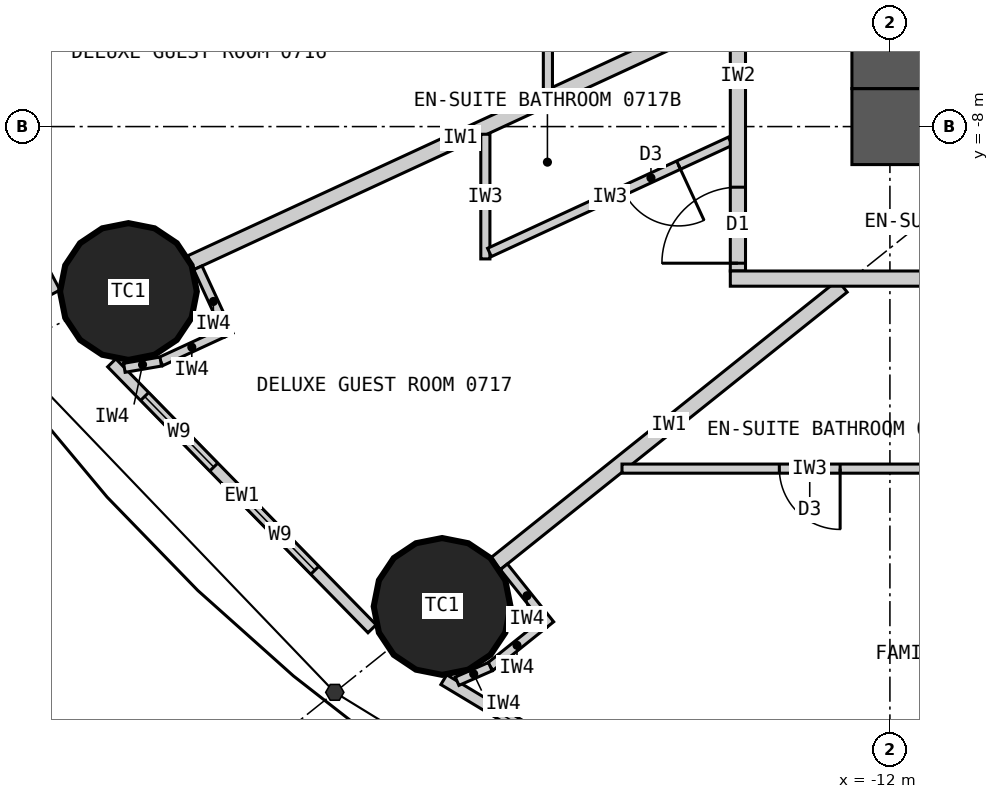
"""IFC4 building model, lengths in metres.
Left out: names, types, materials, properties, quantities, classifications, styles, units other than length and angle.
Written with IfcOpenShell. Run it as: python <this file> out.ifc"""

import sys

from ifc_helpers import new_model, si_unit, direction, frame, frame_2d, origin, origin_2d, place, context, subcontext, project, spatial, rectangle, circle, extrude, element, fill, save


model = new_model("IFC4")
c1 = context("Model", 3, precision=1e-05, world=origin(), true_north=direction((0.0, 1.0)))
c2 = subcontext(c1, "Body", "Model", "MODEL_VIEW")
j1 = project(units=[si_unit("LENGTHUNIT", "METRE"), si_unit("PLANEANGLEUNIT", "RADIAN")], contexts=[c1])
p1 = place(None, origin())
s1 = spatial("IfcSite", under=j1, at=p1, CompositionType="ELEMENT")
p2 = place(p1, origin())
s2 = spatial("IfcBuilding", under=s1, at=p2, CompositionType="ELEMENT")
p3 = place(p2, frame((0.0, 0.0, 36.0)))
s3 = spatial("IfcBuildingStorey", under=s2, at=p3, CompositionType="ELEMENT", Elevation=36.0)
for number, where, z_axis, x_axis in (
    (1, (-22.019, -10.17, 0.0), (0.0, 0.0, 1.0), (1.0, 0.0, 0.0)),
    (2, (-17.892, -14.313, 0.0), (0.0, 0.0, 1.0), (1.0, 0.0, 0.0)),
):
    element("IfcColumn", number, at=place(p3, frame(where, z_axis=z_axis, x_axis=x_axis)), inside=s3, PredefinedType="COLUMN", context=c2, shape_type="SweptSolid", body=[
        extrude(circle(Radius=0.9, at=origin_2d()), origin(), (0.0, 0.0, 1.0), 3.3),
    ])
p4 = place(p3, frame((12.5, -8.0, 0.0), z_axis=(0.0, 0.0, 1.0), x_axis=(-1.0, 0.0, 0.0)))
e3 = element("IfcWall", 3, at=p4, inside=s3, PredefinedType="SHEAR", context=c2, shape_type="SweptSolid", body=[
    extrude(rectangle(XDim=25.0, YDim=1.0, at=frame_2d((12.5, 0.0))), origin(), (0.0, 0.0, 1.0), 3.3),
])
p5 = place(p4, frame((11.2, 0.0, 0.0)))
e4 = element("IfcOpeningElement", 4, at=p5, cuts=e3, PredefinedType="OPENING", context=c2, shape_type="SweptSolid", body=[
    extrude(rectangle(XDim=1.2, YDim=2.2, at=frame_2d((0.6, 1.1))), frame((0.0, 0.51, 0.0), z_axis=(0.0, -1.0, 0.0), x_axis=(1.0, 0.0, 0.0)), (0.0, 0.0, 1.0), 1.02),
])
p6 = place(p4, frame((18.8, 0.0, 0.0)))
e5 = element("IfcOpeningElement", 5, at=p6, cuts=e3, PredefinedType="OPENING", context=c2, shape_type="SweptSolid", body=[
    extrude(rectangle(XDim=0.9, YDim=2.2, at=frame_2d((0.45, 1.1))), frame((0.0, 0.51, 0.0), z_axis=(0.0, -1.0, 0.0), x_axis=(1.0, 0.0, 0.0)), (0.0, 0.0, 1.0), 1.02),
])
p7 = place(p3, frame((-12.0, 7.5, 0.0), z_axis=(0.0, 0.0, 1.0), x_axis=(0.0, -1.0, 0.0)))
e6 = element("IfcWall", 6, at=p7, inside=s3, PredefinedType="SHEAR", context=c2, shape_type="SweptSolid", body=[
    extrude(rectangle(XDim=15.0, YDim=1.0, at=frame_2d((7.5, 0.0))), origin(), (0.0, 0.0, 1.0), 3.3),
])
p8 = place(p7, frame((6.6, 0.0, 0.0)))
e7 = element("IfcOpeningElement", 7, at=p8, cuts=e6, PredefinedType="OPENING", context=c2, shape_type="SweptSolid", body=[
    extrude(rectangle(XDim=1.8, YDim=2.2, at=frame_2d((0.9, 1.1))), frame((0.0, 0.51, 0.0), z_axis=(0.0, -1.0, 0.0), x_axis=(1.0, 0.0, 0.0)), (0.0, 0.0, 1.0), 1.02),
])
p9 = place(p3, frame((-25.139, -6.113, 0.0), z_axis=(0.0, 0.0, 1.0), x_axis=(0.467303182954, -0.884097129959, 0.0)))
e8 = element("IfcWall", 8, at=p9, inside=s3, PredefinedType="ELEMENTEDWALL", context=c2, shape_type="SweptSolid", body=[
    extrude(rectangle(XDim=4.606, YDim=0.15, at=frame_2d((2.303, 0.0))), origin(), (0.0, 0.0, 1.0), 3.12),
])
p10 = place(p9, frame((0.531, 0.0, 0.9)))
e9 = element("IfcOpeningElement", 9, at=p10, cuts=e8, PredefinedType="OPENING", context=c2, shape_type="SweptSolid", body=[
    extrude(rectangle(XDim=1.3, YDim=1.9, at=frame_2d((0.65, 0.95))), frame((0.0, 0.085, 0.0), z_axis=(0.0, -1.0, 0.0), x_axis=(1.0, 0.0, 0.0)), (0.0, 0.0, 1.0), 0.17),
])
p11 = place(p9, frame((2.432, 0.0, 0.9)))
e10 = element("IfcOpeningElement", 10, at=p11, cuts=e8, PredefinedType="OPENING", context=c2, shape_type="SweptSolid", body=[
    extrude(rectangle(XDim=1.3, YDim=1.9, at=frame_2d((0.65, 0.95))), frame((0.0, 0.085, 0.0), z_axis=(0.0, -1.0, 0.0), x_axis=(1.0, 0.0, 0.0)), (0.0, 0.0, 1.0), 0.17),
])
p12 = place(p3, frame((-22.239, -11.108, 0.0), z_axis=(0.0, 0.0, 1.0), x_axis=(0.699612594083, -0.714522370679, 0.0)))
e11 = element("IfcWall", 11, at=p12, inside=s3, PredefinedType="ELEMENTEDWALL", context=c2, shape_type="SweptSolid", body=[
    extrude(rectangle(XDim=4.896, YDim=0.15, at=frame_2d((2.448, 0.0))), origin(), (0.0, 0.0, 1.0), 3.12),
])
p13 = place(p12, frame((0.619, 0.0, 0.9)))
e12 = element("IfcOpeningElement", 12, at=p13, cuts=e11, PredefinedType="OPENING", context=c2, shape_type="SweptSolid", body=[
    extrude(rectangle(XDim=1.3, YDim=1.9, at=frame_2d((0.65, 0.95))), frame((0.0, 0.085, 0.0), z_axis=(0.0, -1.0, 0.0), x_axis=(1.0, 0.0, 0.0)), (0.0, 0.0, 1.0), 0.17),
])
p14 = place(p12, frame((2.519, 0.0, 0.9)))
e13 = element("IfcOpeningElement", 13, at=p14, cuts=e11, PredefinedType="OPENING", context=c2, shape_type="SweptSolid", body=[
    extrude(rectangle(XDim=1.3, YDim=1.9, at=frame_2d((0.65, 0.95))), frame((0.0, 0.085, 0.0), z_axis=(0.0, -1.0, 0.0), x_axis=(1.0, 0.0, 0.0)), (0.0, 0.0, 1.0), 0.17),
])
p15 = place(p3, frame((-17.869, -15.277, 0.0), z_axis=(0.0, 0.0, 1.0), x_axis=(0.856958191554, -0.515385931054, 0.0)))
e14 = element("IfcWall", 14, at=p15, inside=s3, PredefinedType="ELEMENTEDWALL", context=c2, shape_type="SweptSolid", body=[
    extrude(rectangle(XDim=5.201, YDim=0.15, at=frame_2d((2.601, 0.0))), origin(), (0.0, 0.0, 1.0), 3.12),
])
p16 = place(p15, frame((0.776, 0.0, 0.9)))
e15 = element("IfcOpeningElement", 15, at=p16, cuts=e14, PredefinedType="OPENING", context=c2, shape_type="SweptSolid", body=[
    extrude(rectangle(XDim=1.3, YDim=1.9, at=frame_2d((0.65, 0.95))), frame((0.0, 0.085, 0.0), z_axis=(0.0, -1.0, 0.0), x_axis=(1.0, 0.0, 0.0)), (0.0, 0.0, 1.0), 0.17),
])
p17 = place(p15, frame((2.676, 0.0, 0.9)))
e16 = element("IfcOpeningElement", 16, at=p17, cuts=e14, PredefinedType="OPENING", context=c2, shape_type="SweptSolid", body=[
    extrude(rectangle(XDim=1.3, YDim=1.9, at=frame_2d((0.65, 0.95))), frame((0.0, 0.085, 0.0), z_axis=(0.0, -1.0, 0.0), x_axis=(1.0, 0.0, 0.0)), (0.0, 0.0, 1.0), 0.17),
])
p18 = place(p3, frame((-14.1, -6.512, 0.0), z_axis=(0.0, 0.0, 1.0), x_axis=(-0.907842433118, -0.41931147925, 0.0)))
e17 = element("IfcWall", 17, at=p18, inside=s3, PredefinedType="PARTITIONING", context=c2, shape_type="SweptSolid", body=[
    extrude(rectangle(XDim=7.823, YDim=0.2, at=frame_2d((3.912, 0.0))), origin(), (0.0, 0.0, 1.0), 2.32),
])
p19 = place(p3, frame((-12.625, -10.1, 0.0), z_axis=(0.0, 0.0, 1.0), x_axis=(-0.780872884676, -0.624689953479, 0.0)))
e18 = element("IfcWall", 18, at=p19, inside=s3, PredefinedType="PARTITIONING", context=c2, shape_type="SweptSolid", body=[
    extrude(rectangle(XDim=5.845, YDim=0.2, at=frame_2d((2.922, 0.0))), origin(), (0.0, 0.0, 1.0), 2.32),
])
p20 = place(p3, frame((-16.5, -7.521, 0.0), z_axis=(0.0, 0.0, 1.0), x_axis=(0.0, 1.0, 0.0)))
e19 = element("IfcWall", 19, at=p20, inside=s3, PredefinedType="PARTITIONING", context=c2, shape_type="SweptSolid", body=[
    extrude(rectangle(XDim=2.749, YDim=0.12, at=frame_2d((1.374, 0.0))), origin(), (0.0, 0.0, 1.0), 3.12),
])
p21 = place(p3, frame((-17.323, -8.101, 0.0), z_axis=(0.0, 0.0, 1.0), x_axis=(0.0, -1.0, 0.0)))
e20 = element("IfcWall", 20, at=p21, inside=s3, PredefinedType="PARTITIONING", context=c2, shape_type="SweptSolid", body=[
    extrude(rectangle(XDim=1.64, YDim=0.12, at=frame_2d((0.82, 0.0))), origin(), (0.0, 0.0, 1.0), 3.12),
])
p22 = place(p3, frame((-14.1, -8.193, 0.0), z_axis=(0.0, 0.0, 1.0), x_axis=(-0.907836493557, -0.419324338628, 0.0)))
e21 = element("IfcWall", 21, at=p22, inside=s3, PredefinedType="PARTITIONING", context=c2, shape_type="SweptSolid", body=[
    extrude(rectangle(XDim=3.49, YDim=0.12, at=frame_2d((1.745, 0.0))), origin(), (0.0, 0.0, 1.0), 3.12),
])
p23 = place(p22, frame((0.75, 0.0, 0.0)))
e22 = element("IfcOpeningElement", 22, at=p23, cuts=e21, PredefinedType="OPENING", context=c2, shape_type="SweptSolid", body=[
    extrude(rectangle(XDim=0.8, YDim=2.1, at=frame_2d((0.4, 1.05))), frame((0.0, 0.07, 0.0), z_axis=(0.0, -1.0, 0.0), x_axis=(1.0, 0.0, 0.0)), (0.0, 0.0, 1.0), 0.14),
])
p24 = place(p3, frame((-15.525, -12.5, 0.0), z_axis=(0.0, 0.0, 1.0), x_axis=(1.0, 0.0, 0.0)))
e23 = element("IfcWall", 23, at=p24, inside=s3, PredefinedType="PARTITIONING", context=c2, shape_type="SweptSolid", body=[
    extrude(rectangle(XDim=4.94, YDim=0.12, at=frame_2d((2.47, 0.0))), origin(), (0.0, 0.0, 1.0), 3.12),
])
p25 = place(p24, frame((2.07, 0.0, 0.0)))
e24 = element("IfcOpeningElement", 24, at=p25, cuts=e23, PredefinedType="OPENING", context=c2, shape_type="SweptSolid", body=[
    extrude(rectangle(XDim=0.8, YDim=2.1, at=frame_2d((0.4, 1.05))), frame((0.0, 0.07, 0.0), z_axis=(0.0, -1.0, 0.0), x_axis=(1.0, 0.0, 0.0)), (0.0, 0.0, 1.0), 0.14),
])
p26 = place(p3, frame((-14.0, -4.772, 0.0), z_axis=(0.0, 0.0, 1.0), x_axis=(0.0, -1.0, 0.0)))
e25 = element("IfcWall", 25, at=p26, inside=s3, PredefinedType="PARTITIONING", context=c2, shape_type="SweptSolid", body=[
    extrude(rectangle(XDim=5.127, YDim=0.2, at=frame_2d((2.564, 0.0))), origin(), (0.0, 0.0, 1.0), 3.12),
])
p27 = place(p26, frame((4.025, 0.0, 0.0)))
e26 = element("IfcOpeningElement", 26, at=p27, cuts=e25, PredefinedType="OPENING", context=c2, shape_type="SweptSolid", body=[
    extrude(rectangle(XDim=1.0, YDim=2.2, at=frame_2d((0.5, 1.1))), frame((0.0, 0.11, 0.0), z_axis=(0.0, -1.0, 0.0), x_axis=(1.0, 0.0, 0.0)), (0.0, 0.0, 1.0), 0.22),
])
p28 = place(p3, frame((-3.499, -10.0, 0.0), z_axis=(0.0, 0.0, 1.0), x_axis=(-1.0, 0.0, 0.0)))
e27 = element("IfcWall", 27, at=p28, inside=s3, PredefinedType="PARTITIONING", context=c2, shape_type="SweptSolid", body=[
    extrude(rectangle(XDim=10.602, YDim=0.2, at=frame_2d((5.301, 0.0))), origin(), (0.0, 0.0, 1.0), 3.12),
])
p29 = place(p28, frame((4.846, 0.0, 0.0)))
e28 = element("IfcOpeningElement", 28, at=p29, cuts=e27, PredefinedType="OPENING", context=c2, shape_type="SweptSolid", body=[
    extrude(rectangle(XDim=1.0, YDim=2.2, at=frame_2d((0.5, 1.1))), frame((0.0, 0.11, 0.0), z_axis=(0.0, -1.0, 0.0), x_axis=(1.0, 0.0, 0.0)), (0.0, 0.0, 1.0), 0.22),
])
p30 = place(p3, frame((-21.106, -9.858, 0.0), z_axis=(0.0, 0.0, 1.0), x_axis=(0.419344098106, -0.907827366509, 0.0)))
e29 = element("IfcWall", 29, at=p30, inside=s3, PredefinedType="PARTITIONING", context=c2, shape_type="SweptSolid", body=[
    extrude(rectangle(XDim=0.975, YDim=0.12, at=frame_2d((0.487, 0.0))), origin(), (0.0, 0.0, 1.0), 3.12),
])
p31 = place(p3, frame((-20.777, -10.714, 0.0), z_axis=(0.0, 0.0, 1.0), x_axis=(-0.907832324198, -0.419333365166, 0.0)))
e30 = element("IfcWall", 30, at=p31, inside=s3, PredefinedType="PARTITIONING", context=c2, shape_type="SweptSolid", body=[
    extrude(rectangle(XDim=0.9, YDim=0.12, at=frame_2d((0.45, 0.0))), origin(), (0.0, 0.0, 1.0), 3.12),
])
p32 = place(p3, frame((-21.594, -11.091, 0.0), z_axis=(0.0, 0.0, 1.0), x_axis=(-0.985483306792, -0.169772353566, 0.0)))
e31 = element("IfcWall", 31, at=p32, inside=s3, PredefinedType="PARTITIONING", context=c2, shape_type="SweptSolid", body=[
    extrude(rectangle(XDim=0.486, YDim=0.12, at=frame_2d((0.243, 0.0))), origin(), (0.0, 0.0, 1.0), 3.12),
])
p33 = place(p3, frame((-17.08, -13.792, 0.0), z_axis=(0.0, 0.0, 1.0), x_axis=(0.624756144097, -0.780819928289, 0.0)))
e32 = element("IfcWall", 32, at=p33, inside=s3, PredefinedType="PARTITIONING", context=c2, shape_type="SweptSolid", body=[
    extrude(rectangle(XDim=0.975, YDim=0.12, at=frame_2d((0.487, 0.0))), origin(), (0.0, 0.0, 1.0), 3.12),
])
p34 = place(p3, frame((-16.555, -14.543, 0.0), z_axis=(0.0, 0.0, 1.0), x_axis=(-0.780789399477, -0.62479429708, 0.0)))
e33 = element("IfcWall", 33, at=p34, inside=s3, PredefinedType="PARTITIONING", context=c2, shape_type="SweptSolid", body=[
    extrude(rectangle(XDim=0.9, YDim=0.12, at=frame_2d((0.45, 0.0))), origin(), (0.0, 0.0, 1.0), 3.12),
])
p35 = place(p3, frame((-17.258, -15.106, 0.0), z_axis=(0.0, 0.0, 1.0), x_axis=(-0.916098562583, -0.400953143937, 0.0)))
e34 = element("IfcWall", 34, at=p35, inside=s3, PredefinedType="PARTITIONING", context=c2, shape_type="SweptSolid", body=[
    extrude(rectangle(XDim=0.477, YDim=0.12, at=frame_2d((0.238, 0.0))), origin(), (0.0, 0.0, 1.0), 3.12),
])
p36 = place(p13, origin())
e35 = element("IfcWindow", 35, at=p36, inside=s3, PartitioningType="SINGLE_PANEL", PredefinedType="WINDOW", context=c2, shape_type="SweptSolid", body=[
    extrude(rectangle(XDim=1.3, YDim=1.9, at=frame_2d((0.65, 0.95))), frame((0.0, 0.03, 0.0), z_axis=(0.0, -1.0, 0.0), x_axis=(1.0, 0.0, 0.0)), (0.0, 0.0, 1.0), 0.06),
])
fill(e12, e35)
p37 = place(p14, origin())
e36 = element("IfcWindow", 36, at=p37, inside=s3, PartitioningType="SINGLE_PANEL", PredefinedType="WINDOW", context=c2, shape_type="SweptSolid", body=[
    extrude(rectangle(XDim=1.3, YDim=1.9, at=frame_2d((0.65, 0.95))), frame((0.0, 0.03, 0.0), z_axis=(0.0, -1.0, 0.0), x_axis=(1.0, 0.0, 0.0)), (0.0, 0.0, 1.0), 0.06),
])
fill(e13, e36)
p38 = place(p16, origin())
e37 = element("IfcWindow", 37, at=p38, inside=s3, PartitioningType="SINGLE_PANEL", PredefinedType="WINDOW", context=c2, shape_type="SweptSolid", body=[
    extrude(rectangle(XDim=1.3, YDim=1.9, at=frame_2d((0.65, 0.95))), frame((0.0, 0.03, 0.0), z_axis=(0.0, -1.0, 0.0), x_axis=(1.0, 0.0, 0.0)), (0.0, 0.0, 1.0), 0.06),
])
fill(e15, e37)
p39 = place(p23, origin())
e38 = element("IfcDoor", 38, at=p39, inside=s3, OperationType="SINGLE_SWING_LEFT", PredefinedType="DOOR", context=c2, shape_type="SweptSolid", body=[
    extrude(rectangle(XDim=0.8, YDim=2.1, at=frame_2d((0.4, 1.05))), frame((0.0, 0.025, 0.0), z_axis=(0.0, -1.0, 0.0), x_axis=(1.0, 0.0, 0.0)), (0.0, 0.0, 1.0), 0.05),
])
fill(e22, e38)
p40 = place(p27, origin())
e39 = element("IfcDoor", 39, at=p40, inside=s3, OperationType="SINGLE_SWING_RIGHT", PredefinedType="DOOR", context=c2, shape_type="SweptSolid", body=[
    extrude(rectangle(XDim=1.0, YDim=2.2, at=frame_2d((0.5, 1.1))), frame((0.0, 0.025, 0.0), z_axis=(0.0, -1.0, 0.0), x_axis=(1.0, 0.0, 0.0)), (0.0, 0.0, 1.0), 0.05),
])
fill(e26, e39)
p41 = place(p25, origin())
e40 = element("IfcDoor", 40, at=p41, inside=s3, OperationType="SINGLE_SWING_RIGHT", PredefinedType="DOOR", context=c2, shape_type="SweptSolid", body=[
    extrude(rectangle(XDim=0.8, YDim=2.1, at=frame_2d((0.4, 1.05))), frame((0.0, 0.025, 0.0), z_axis=(0.0, -1.0, 0.0), x_axis=(1.0, 0.0, 0.0)), (0.0, 0.0, 1.0), 0.05),
])
fill(e24, e40)
save(model, sys.argv[1])
